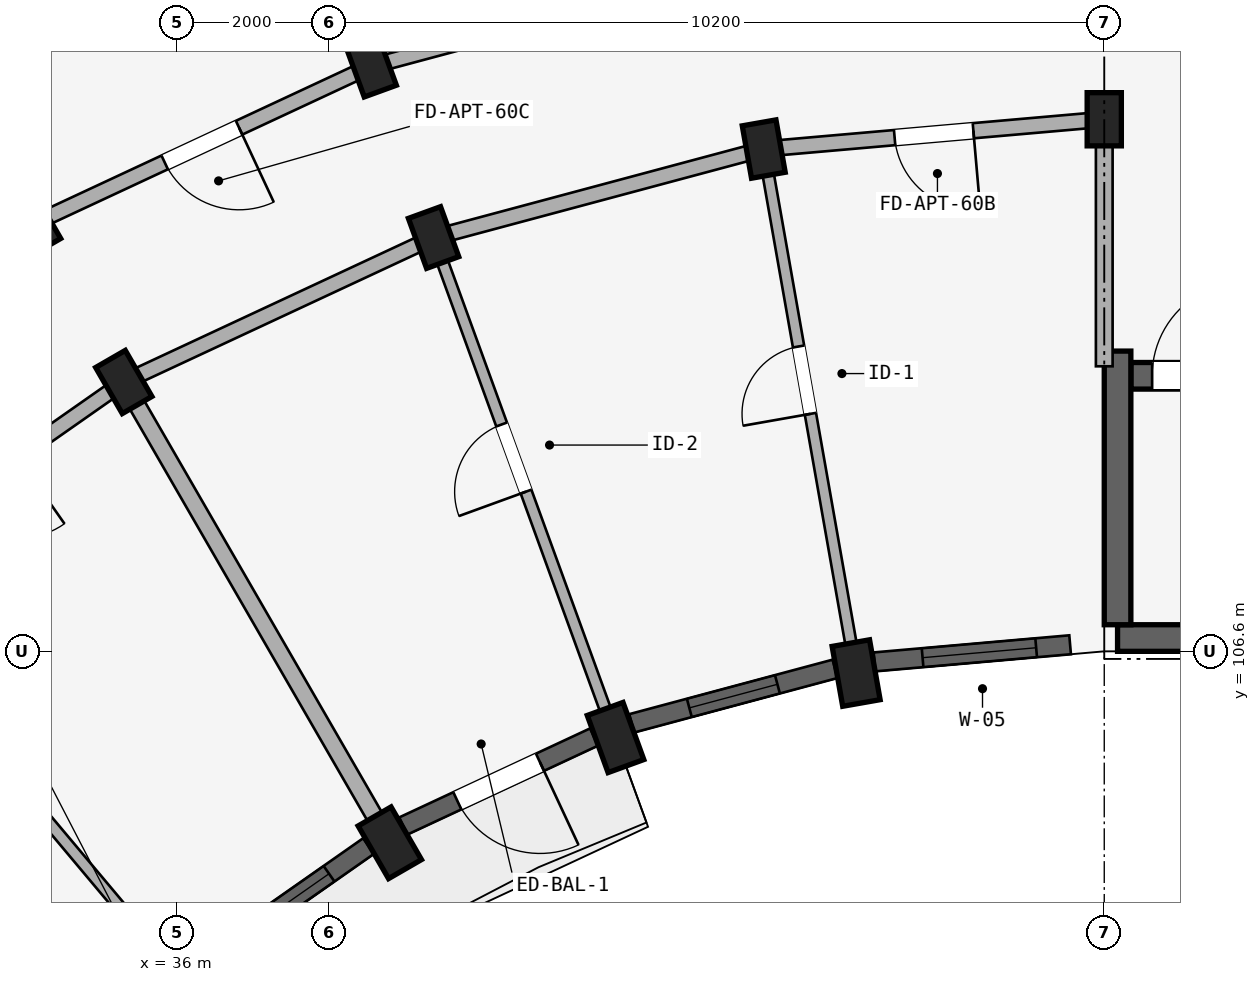
"""IFC4 building model, lengths in metres.
Left out: names, types, materials, properties, quantities, classifications, styles, units other than length and angle.
Written with IfcOpenShell. Run it as: python <this file> out.ifc"""

import sys

from ifc_helpers import new_model, si_unit, direction, frame, frame_2d, origin, origin_2d, place, context, subcontext, project, spatial, rectangle, extrude, element, fill, save


model = new_model("IFC4")
c1 = context("Model", 3, precision=1e-05, world=origin(), true_north=direction((0.0, 1.0)))
c2 = subcontext(c1, "Body", "Model", "MODEL_VIEW")
j1 = project(units=[si_unit("LENGTHUNIT", "METRE"), si_unit("PLANEANGLEUNIT", "RADIAN")], contexts=[c1])
p1 = place(None, origin())
s1 = spatial("IfcSite", under=j1, at=p1, CompositionType="ELEMENT")
p2 = place(p1, origin())
s2 = spatial("IfcBuilding", under=s1, at=p2, CompositionType="ELEMENT")
p3 = place(p2, frame((0.0, 0.0, 24.45)))
s3 = spatial("IfcBuildingStorey", under=s2, at=p3, CompositionType="ELEMENT", Elevation=24.45)
p4 = place(p3, frame((48.375, 106.775, 0.0), z_axis=(0.0, 0.0, 1.0), x_axis=(1.0, 0.0, 0.0)))
e1 = element("IfcWall", 1, at=p4, inside=s3, PredefinedType="SHEAR", context=c2, shape_type="SweptSolid", body=[
    extrude(rectangle(XDim=8.25, YDim=0.35, at=frame_2d((4.125, 0.0))), origin(), (0.0, 0.0, 1.0), 2.93),
])
p5 = place(p3, frame((48.55, 110.225, 0.0), z_axis=(0.0, 0.0, 1.0), x_axis=(1.0, 0.0, 0.0)))
e2 = element("IfcWall", 2, at=p5, inside=s3, PredefinedType="SHEAR", context=c2, shape_type="SweptSolid", body=[
    extrude(rectangle(XDim=7.9, YDim=0.35, at=frame_2d((3.95, 0.0))), origin(), (0.0, 0.0, 1.0), 2.93),
])
p6 = place(p5, frame((0.28, 0.0, 0.0)))
e3 = element("IfcOpeningElement", 3, at=p6, cuts=e2, PredefinedType="OPENING", context=c2, shape_type="SweptSolid", body=[
    extrude(rectangle(XDim=1.24, YDim=2.15, at=frame_2d((0.62, 1.075))), frame((0.0, 0.185, 0.0), z_axis=(0.0, -1.0, 0.0), x_axis=(1.0, 0.0, 0.0)), (0.0, 0.0, 1.0), 0.37),
])
p7 = place(p3, frame((48.375, 106.95, 0.0), z_axis=(0.0, 0.0, 1.0), x_axis=(0.0, 1.0, 0.0)))
e4 = element("IfcWall", 4, at=p7, inside=s3, PredefinedType="SHEAR", context=c2, shape_type="SweptSolid", body=[
    extrude(rectangle(XDim=3.6, YDim=0.35, at=frame_2d((1.8, 0.0))), origin(), (0.0, 0.0, 1.0), 2.93),
])
p8 = place(p3, frame((48.2, 113.6, 0.0), z_axis=(0.0, 0.0, 1.0), x_axis=(1.0, 0.0, 0.0)))
e5 = element("IfcColumn", 5, at=p8, inside=s3, PredefinedType="COLUMN", context=c2, shape_type="SweptSolid", body=[
    extrude(rectangle(XDim=0.45, YDim=0.7, at=origin_2d()), origin(), (0.0, 0.0, 1.0), 2.93),
])
p9 = place(p3, frame((44.935, 106.314, 0.0), z_axis=(0.0, 0.0, 1.0), x_axis=(0.984807753012, 0.173648177667, 0.0)))
e6 = element("IfcColumn", 6, at=p9, inside=s3, PredefinedType="COLUMN", context=c2, shape_type="SweptSolid", body=[
    extrude(rectangle(XDim=0.5, YDim=0.8, at=origin_2d()), origin(), (0.0, 0.0, 1.0), 2.93),
])
p10 = place(p3, frame((43.72, 113.208, 0.0), z_axis=(0.0, 0.0, 1.0), x_axis=(0.984807753012, 0.173648177667, 0.0)))
e7 = element("IfcColumn", 7, at=p10, inside=s3, PredefinedType="COLUMN", context=c2, shape_type="SweptSolid", body=[
    extrude(rectangle(XDim=0.45, YDim=0.7, at=origin_2d()), origin(), (0.0, 0.0, 1.0), 2.93),
])
p11 = place(p3, frame((41.77, 105.466, 0.0), z_axis=(0.0, 0.0, 1.0), x_axis=(0.939692620786, 0.342020143326, 0.0)))
e8 = element("IfcColumn", 8, at=p11, inside=s3, PredefinedType="COLUMN", context=c2, shape_type="SweptSolid", body=[
    extrude(rectangle(XDim=0.5, YDim=0.8, at=origin_2d()), origin(), (0.0, 0.0, 1.0), 2.93),
])
for number, where, z_axis, x_axis in (
    (9, (39.376, 112.044, 0.0), (0.0, 0.0, 1.0), (0.94, 0.342, 0.0)),
    (10, (38.555, 114.299, 0.0), (0.0, 0.0, 1.0), (0.94, 0.342, 0.0)),
):
    element("IfcColumn", number, at=place(p3, frame(where, z_axis=z_axis, x_axis=x_axis)), inside=s3, PredefinedType="COLUMN", context=c2, shape_type="SweptSolid", body=[
        extrude(rectangle(XDim=0.45, YDim=0.7, at=origin_2d()), origin(), (0.0, 0.0, 1.0), 2.93),
    ])
p12 = place(p3, frame((38.8, 104.081, 0.0), z_axis=(0.0, 0.0, 1.0), x_axis=(0.866025403784, 0.5, 0.0)))
e11 = element("IfcColumn", 11, at=p12, inside=s3, PredefinedType="COLUMN", context=c2, shape_type="SweptSolid", body=[
    extrude(rectangle(XDim=0.5, YDim=0.8, at=origin_2d()), origin(), (0.0, 0.0, 1.0), 2.93),
])
for number, where, z_axis, x_axis in (
    (12, (35.3, 110.144, 0.0), (0.0, 0.0, 1.0), (0.866, 0.5, 0.0)),
    (13, (34.1, 112.222, 0.0), (0.0, 0.0, 1.0), (0.866, 0.5, 0.0)),
):
    element("IfcColumn", number, at=place(p3, frame(where, z_axis=z_axis, x_axis=x_axis)), inside=s3, PredefinedType="COLUMN", context=c2, shape_type="SweptSolid", body=[
        extrude(rectangle(XDim=0.45, YDim=0.7, at=origin_2d()), origin(), (0.0, 0.0, 1.0), 2.93),
    ])
p13 = place(p3, frame((48.2, 113.6, 0.0), z_axis=(0.0, 0.0, 1.0), x_axis=(-0.996191949488, -0.087187153726, 0.0)))
e14 = element("IfcWall", 14, at=p13, inside=s3, PredefinedType="STANDARD", context=c2, shape_type="SweptSolid", body=[
    extrude(rectangle(XDim=4.497, YDim=0.2, at=frame_2d((2.249, 0.0))), origin(), (0.0, 0.0, 1.0), 2.372),
])
p14 = place(p13, frame((1.729, 0.0, 0.0)))
e15 = element("IfcOpeningElement", 15, at=p14, cuts=e14, PredefinedType="OPENING", context=c2, shape_type="SweptSolid", body=[
    extrude(rectangle(XDim=1.04, YDim=2.15, at=frame_2d((0.52, 1.075))), frame((0.0, 0.11, 0.0), z_axis=(0.0, -1.0, 0.0), x_axis=(1.0, 0.0, 0.0)), (0.0, 0.0, 1.0), 0.22),
])
p15 = place(p3, frame((43.72, 113.208, 0.0), z_axis=(0.0, 0.0, 1.0), x_axis=(-0.965934240054, -0.258787642463, 0.0)))
e16 = element("IfcWall", 16, at=p15, inside=s3, PredefinedType="STANDARD", context=c2, shape_type="SweptSolid", body=[
    extrude(rectangle(XDim=4.497, YDim=0.2, at=frame_2d((2.249, 0.0))), origin(), (0.0, 0.0, 1.0), 2.372),
])
p16 = place(p3, frame((43.303, 115.572, 0.0), z_axis=(0.0, 0.0, 1.0), x_axis=(-0.965930095386, -0.258803112091, 0.0)))
e17 = element("IfcWall", 17, at=p16, inside=s3, PredefinedType="STANDARD", context=c2, shape_type="SweptSolid", body=[
    extrude(rectangle(XDim=4.916, YDim=0.2, at=frame_2d((2.458, 0.0))), origin(), (0.0, 0.0, 1.0), 2.372),
])
p17 = place(p3, frame((39.376, 112.044, 0.0), z_axis=(0.0, 0.0, 1.0), x_axis=(-0.906307919131, -0.422617978463, 0.0)))
e18 = element("IfcWall", 18, at=p17, inside=s3, PredefinedType="STANDARD", context=c2, shape_type="SweptSolid", body=[
    extrude(rectangle(XDim=4.497, YDim=0.2, at=frame_2d((2.249, 0.0))), origin(), (0.0, 0.0, 1.0), 2.372),
])
p18 = place(p3, frame((38.555, 114.299, 0.0), z_axis=(0.0, 0.0, 1.0), x_axis=(-0.906302381024, -0.422629854778, 0.0)))
e19 = element("IfcWall", 19, at=p18, inside=s3, PredefinedType="STANDARD", context=c2, shape_type="SweptSolid", body=[
    extrude(rectangle(XDim=4.915, YDim=0.2, at=frame_2d((2.458, 0.0))), origin(), (0.0, 0.0, 1.0), 2.372),
])
p19 = place(p18, frame((1.918, 0.0, 0.0)))
e20 = element("IfcOpeningElement", 20, at=p19, cuts=e19, PredefinedType="OPENING", context=c2, shape_type="SweptSolid", body=[
    extrude(rectangle(XDim=1.08, YDim=2.15, at=frame_2d((0.54, 1.075))), frame((0.0, 0.11, 0.0), z_axis=(0.0, -1.0, 0.0), x_axis=(1.0, 0.0, 0.0)), (0.0, 0.0, 1.0), 0.22),
])
p20 = place(p3, frame((35.3, 110.144, 0.0), z_axis=(0.0, 0.0, 1.0), x_axis=(-0.819155404658, -0.573571637217, 0.0)))
e21 = element("IfcWall", 21, at=p20, inside=s3, PredefinedType="STANDARD", context=c2, shape_type="SweptSolid", body=[
    extrude(rectangle(XDim=4.497, YDim=0.2, at=frame_2d((2.249, 0.0))), origin(), (0.0, 0.0, 1.0), 2.372),
])
p21 = place(p20, frame((1.709, 0.0, 0.0)))
e22 = element("IfcOpeningElement", 22, at=p21, cuts=e21, PredefinedType="OPENING", context=c2, shape_type="SweptSolid", body=[
    extrude(rectangle(XDim=1.08, YDim=2.15, at=frame_2d((0.54, 1.075))), frame((0.0, 0.11, 0.0), z_axis=(0.0, -1.0, 0.0), x_axis=(1.0, 0.0, 0.0)), (0.0, 0.0, 1.0), 0.22),
])
p22 = place(p3, frame((48.2, 110.35, 0.0), z_axis=(0.0, 0.0, 1.0), x_axis=(0.0, 1.0, 0.0)))
e23 = element("IfcWall", 23, at=p22, inside=s3, PredefinedType="STANDARD", context=c2, shape_type="SweptSolid", body=[
    extrude(rectangle(XDim=3.2, YDim=0.22, at=frame_2d((1.6, 0.0))), origin(), (0.0, 0.0, 1.0), 2.372),
])
p23 = place(p3, frame((44.901, 106.511, 0.0), z_axis=(0.0, 0.0, 1.0), x_axis=(-0.173647089161, 0.984807944945, 0.0)))
e24 = element("IfcWall", 24, at=p23, inside=s3, PredefinedType="PARTITIONING", context=c2, shape_type="SweptSolid", body=[
    extrude(rectangle(XDim=6.75, YDim=0.15, at=frame_2d((3.375, 0.0))), origin(), (0.0, 0.0, 1.0), 2.372),
])
p24 = place(p23, frame((3.262, 0.0, 0.0)))
e25 = element("IfcOpeningElement", 25, at=p24, cuts=e24, PredefinedType="OPENING", context=c2, shape_type="SweptSolid", body=[
    extrude(rectangle(XDim=0.9, YDim=2.1, at=frame_2d((0.45, 1.05))), frame((0.0, 0.085, 0.0), z_axis=(0.0, -1.0, 0.0), x_axis=(1.0, 0.0, 0.0)), (0.0, 0.0, 1.0), 0.17),
])
p25 = place(p3, frame((41.702, 105.654, 0.0), z_axis=(0.0, 0.0, 1.0), x_axis=(-0.342010221662, 0.939696231917, 0.0)))
e26 = element("IfcWall", 26, at=p25, inside=s3, PredefinedType="PARTITIONING", context=c2, shape_type="SweptSolid", body=[
    extrude(rectangle(XDim=6.75, YDim=0.15, at=frame_2d((3.375, 0.0))), origin(), (0.0, 0.0, 1.0), 2.372),
])
p26 = place(p25, frame((3.242, 0.0, 0.0)))
e27 = element("IfcOpeningElement", 27, at=p26, cuts=e26, PredefinedType="OPENING", context=c2, shape_type="SweptSolid", body=[
    extrude(rectangle(XDim=0.94, YDim=2.1, at=frame_2d((0.47, 1.05))), frame((0.0, 0.085, 0.0), z_axis=(0.0, -1.0, 0.0), x_axis=(1.0, 0.0, 0.0)), (0.0, 0.0, 1.0), 0.17),
])
p27 = place(p3, frame((38.521, 114.393, 0.0), z_axis=(0.0, 0.0, 1.0), x_axis=(-0.342022120477, 0.939691901159, 0.0)))
e28 = element("IfcWall", 28, at=p27, inside=s3, PredefinedType="STANDARD", context=c2, shape_type="SweptSolid", body=[
    extrude(rectangle(XDim=17.42, YDim=0.22, at=frame_2d((8.71, 0.0))), origin(), (0.0, 0.0, 1.0), 2.372),
])
p28 = place(p3, frame((38.7, 104.254, 0.0), z_axis=(0.0, 0.0, 1.0), x_axis=(-0.499997969693, 0.866026575979, 0.0)))
e29 = element("IfcWall", 29, at=p28, inside=s3, PredefinedType="STANDARD", context=c2, shape_type="SweptSolid", body=[
    extrude(rectangle(XDim=6.75, YDim=0.22, at=frame_2d((3.375, 0.0))), origin(), (0.0, 0.0, 1.0), 2.372),
])
p29 = place(p3, frame((35.987, 102.355, 0.0), z_axis=(0.0, 0.0, 1.0), x_axis=(-0.642784846501, 0.766046761698, 0.0)))
e30 = element("IfcWall", 30, at=p29, inside=s3, PredefinedType="PARTITIONING", context=c2, shape_type="SweptSolid", body=[
    extrude(rectangle(XDim=6.75, YDim=0.15, at=frame_2d((3.375, 0.0))), origin(), (0.0, 0.0, 1.0), 2.372),
])
p30 = place(p29, frame((3.262, 0.0, 0.0)))
e31 = element("IfcOpeningElement", 31, at=p30, cuts=e30, PredefinedType="OPENING", context=c2, shape_type="SweptSolid", body=[
    extrude(rectangle(XDim=0.9, YDim=2.1, at=frame_2d((0.45, 1.05))), frame((0.0, 0.085, 0.0), z_axis=(0.0, -1.0, 0.0), x_axis=(1.0, 0.0, 0.0)), (0.0, 0.0, 1.0), 0.17),
])
p31 = place(p3, frame((47.751, 106.686, 0.0), z_axis=(0.0, 0.0, 1.0), x_axis=(-0.996188278786, -0.087229084652, 0.0)))
e32 = element("IfcWall", 32, at=p31, inside=s3, PredefinedType="STANDARD", context=c2, shape_type="SweptSolid", body=[
    extrude(rectangle(XDim=2.583, YDim=0.25, at=frame_2d((1.292, 0.0))), origin(), (0.0, 0.0, 1.0), 2.422),
])
p32 = place(p31, frame((0.448, 0.0, 0.572)))
e33 = element("IfcOpeningElement", 33, at=p32, cuts=e32, PredefinedType="OPENING", context=c2, shape_type="SweptSolid", body=[
    extrude(rectangle(XDim=1.5, YDim=1.65, at=frame_2d((0.75, 0.825))), frame((0.0, 0.135, 0.0), z_axis=(0.0, -1.0, 0.0), x_axis=(1.0, 0.0, 0.0)), (0.0, 0.0, 1.0), 0.27),
])
p33 = place(p3, frame((44.658, 106.369, 0.0), z_axis=(0.0, 0.0, 1.0), x_axis=(-0.965935855992, -0.25878161084, 0.0)))
e34 = element("IfcWall", 34, at=p33, inside=s3, PredefinedType="STANDARD", context=c2, shape_type="SweptSolid", body=[
    extrude(rectangle(XDim=2.77, YDim=0.25, at=frame_2d((1.385, 0.0))), origin(), (0.0, 0.0, 1.0), 2.422),
])
p34 = place(p33, frame((0.785, 0.0, 0.722)))
e35 = element("IfcOpeningElement", 35, at=p34, cuts=e34, PredefinedType="OPENING", context=c2, shape_type="SweptSolid", body=[
    extrude(rectangle(XDim=1.2, YDim=1.5, at=frame_2d((0.6, 0.75))), frame((0.0, 0.135, 0.0), z_axis=(0.0, -1.0, 0.0), x_axis=(1.0, 0.0, 0.0)), (0.0, 0.0, 1.0), 0.27),
])
p35 = place(p3, frame((41.487, 105.472, 0.0), z_axis=(0.0, 0.0, 1.0), x_axis=(-0.906293449611, -0.422649007088, 0.0)))
e36 = element("IfcWall", 36, at=p35, inside=s3, PredefinedType="STANDARD", context=c2, shape_type="SweptSolid", body=[
    extrude(rectangle(XDim=2.77, YDim=0.25, at=frame_2d((1.385, 0.0))), origin(), (0.0, 0.0, 1.0), 2.422),
])
p36 = place(p35, frame((0.785, 0.0, 0.0)))
e37 = element("IfcOpeningElement", 37, at=p36, cuts=e36, PredefinedType="OPENING", context=c2, shape_type="SweptSolid", body=[
    extrude(rectangle(XDim=1.2, YDim=2.15, at=frame_2d((0.6, 1.075))), frame((0.0, 0.135, 0.0), z_axis=(0.0, -1.0, 0.0), x_axis=(1.0, 0.0, 0.0)), (0.0, 0.0, 1.0), 0.27),
])
p37 = place(p3, frame((38.521, 104.038, 0.0), z_axis=(0.0, 0.0, 1.0), x_axis=(-0.819111815273, -0.573633885053, 0.0)))
e38 = element("IfcWall", 38, at=p37, inside=s3, PredefinedType="STANDARD", context=c2, shape_type="SweptSolid", body=[
    extrude(rectangle(XDim=2.77, YDim=0.25, at=frame_2d((1.385, 0.0))), origin(), (0.0, 0.0, 1.0), 2.422),
])
p38 = place(p37, frame((0.635, 0.0, 0.572)))
e39 = element("IfcOpeningElement", 39, at=p38, cuts=e38, PredefinedType="OPENING", context=c2, shape_type="SweptSolid", body=[
    extrude(rectangle(XDim=1.5, YDim=1.65, at=frame_2d((0.75, 0.825))), frame((0.0, 0.135, 0.0), z_axis=(0.0, -1.0, 0.0), x_axis=(1.0, 0.0, 0.0)), (0.0, 0.0, 1.0), 0.27),
])
p39 = place(p32, origin())
e40 = element("IfcWindow", 40, at=p39, inside=s3, PartitioningType="DOUBLE_PANEL_VERTICAL", PredefinedType="WINDOW", context=c2, shape_type="SweptSolid", body=[
    extrude(rectangle(XDim=1.5, YDim=1.65, at=frame_2d((0.75, 0.825))), frame((0.0, 0.03, 0.0), z_axis=(0.0, -1.0, 0.0), x_axis=(1.0, 0.0, 0.0)), (0.0, 0.0, 1.0), 0.06),
])
fill(e33, e40)
p40 = place(p34, origin())
e41 = element("IfcWindow", 41, at=p40, inside=s3, PartitioningType="SINGLE_PANEL", PredefinedType="WINDOW", context=c2, shape_type="SweptSolid", body=[
    extrude(rectangle(XDim=1.2, YDim=1.5, at=frame_2d((0.6, 0.75))), frame((0.0, 0.03, 0.0), z_axis=(0.0, -1.0, 0.0), x_axis=(1.0, 0.0, 0.0)), (0.0, 0.0, 1.0), 0.06),
])
fill(e35, e41)
p41 = place(p38, origin())
e42 = element("IfcWindow", 42, at=p41, inside=s3, PartitioningType="DOUBLE_PANEL_VERTICAL", PredefinedType="WINDOW", context=c2, shape_type="SweptSolid", body=[
    extrude(rectangle(XDim=1.5, YDim=1.65, at=frame_2d((0.75, 0.825))), frame((0.0, 0.03, 0.0), z_axis=(0.0, -1.0, 0.0), x_axis=(1.0, 0.0, 0.0)), (0.0, 0.0, 1.0), 0.06),
])
fill(e39, e42)
p42 = place(p6, frame((1.24, 0.0, 0.0), z_axis=(0.0, 0.0, 1.0), x_axis=(-1.0, 0.0, 0.0)))
e43 = element("IfcDoor", 43, at=p42, inside=s3, OperationType="SINGLE_SWING_LEFT", PredefinedType="DOOR", context=c2, shape_type="SweptSolid", body=[
    extrude(rectangle(XDim=1.24, YDim=2.15, at=frame_2d((0.62, 1.075))), frame((0.0, 0.025, 0.0), z_axis=(0.0, -1.0, 0.0), x_axis=(1.0, 0.0, 0.0)), (0.0, 0.0, 1.0), 0.05),
])
fill(e3, e43)
p43 = place(p24, origin())
e44 = element("IfcDoor", 44, at=p43, inside=s3, OperationType="SINGLE_SWING_LEFT", PredefinedType="DOOR", context=c2, shape_type="SweptSolid", body=[
    extrude(rectangle(XDim=0.9, YDim=2.1, at=frame_2d((0.45, 1.05))), frame((0.0, 0.025, 0.0), z_axis=(0.0, -1.0, 0.0), x_axis=(1.0, 0.0, 0.0)), (0.0, 0.0, 1.0), 0.05),
])
fill(e25, e44)
p44 = place(p26, origin())
e45 = element("IfcDoor", 45, at=p44, inside=s3, OperationType="SINGLE_SWING_LEFT", PredefinedType="DOOR", context=c2, shape_type="SweptSolid", body=[
    extrude(rectangle(XDim=0.94, YDim=2.1, at=frame_2d((0.47, 1.05))), frame((0.0, 0.025, 0.0), z_axis=(0.0, -1.0, 0.0), x_axis=(1.0, 0.0, 0.0)), (0.0, 0.0, 1.0), 0.05),
])
fill(e27, e45)
p45 = place(p19, frame((1.08, 0.0, 0.0), z_axis=(0.0, 0.0, 1.0), x_axis=(-1.0, 0.0, 0.0)))
e46 = element("IfcDoor", 46, at=p45, inside=s3, OperationType="SINGLE_SWING_RIGHT", PredefinedType="DOOR", context=c2, shape_type="SweptSolid", body=[
    extrude(rectangle(XDim=1.08, YDim=2.15, at=frame_2d((0.54, 1.075))), frame((0.0, 0.025, 0.0), z_axis=(0.0, -1.0, 0.0), x_axis=(1.0, 0.0, 0.0)), (0.0, 0.0, 1.0), 0.05),
])
fill(e20, e46)
p46 = place(p14, frame((1.04, 0.0, 0.0), z_axis=(0.0, 0.0, 1.0), x_axis=(-1.0, 0.0, 0.0)))
e47 = element("IfcDoor", 47, at=p46, inside=s3, OperationType="SINGLE_SWING_RIGHT", PredefinedType="DOOR", context=c2, shape_type="SweptSolid", body=[
    extrude(rectangle(XDim=1.04, YDim=2.15, at=frame_2d((0.52, 1.075))), frame((0.0, 0.025, 0.0), z_axis=(0.0, -1.0, 0.0), x_axis=(1.0, 0.0, 0.0)), (0.0, 0.0, 1.0), 0.05),
])
fill(e15, e47)
p47 = place(p36, origin())
e48 = element("IfcDoor", 48, at=p47, inside=s3, OperationType="SINGLE_SWING_LEFT", PredefinedType="DOOR", context=c2, shape_type="SweptSolid", body=[
    extrude(rectangle(XDim=1.2, YDim=2.15, at=frame_2d((0.6, 1.075))), frame((0.0, 0.025, 0.0), z_axis=(0.0, -1.0, 0.0), x_axis=(1.0, 0.0, 0.0)), (0.0, 0.0, 1.0), 0.05),
])
fill(e37, e48)
save(model, sys.argv[1])
